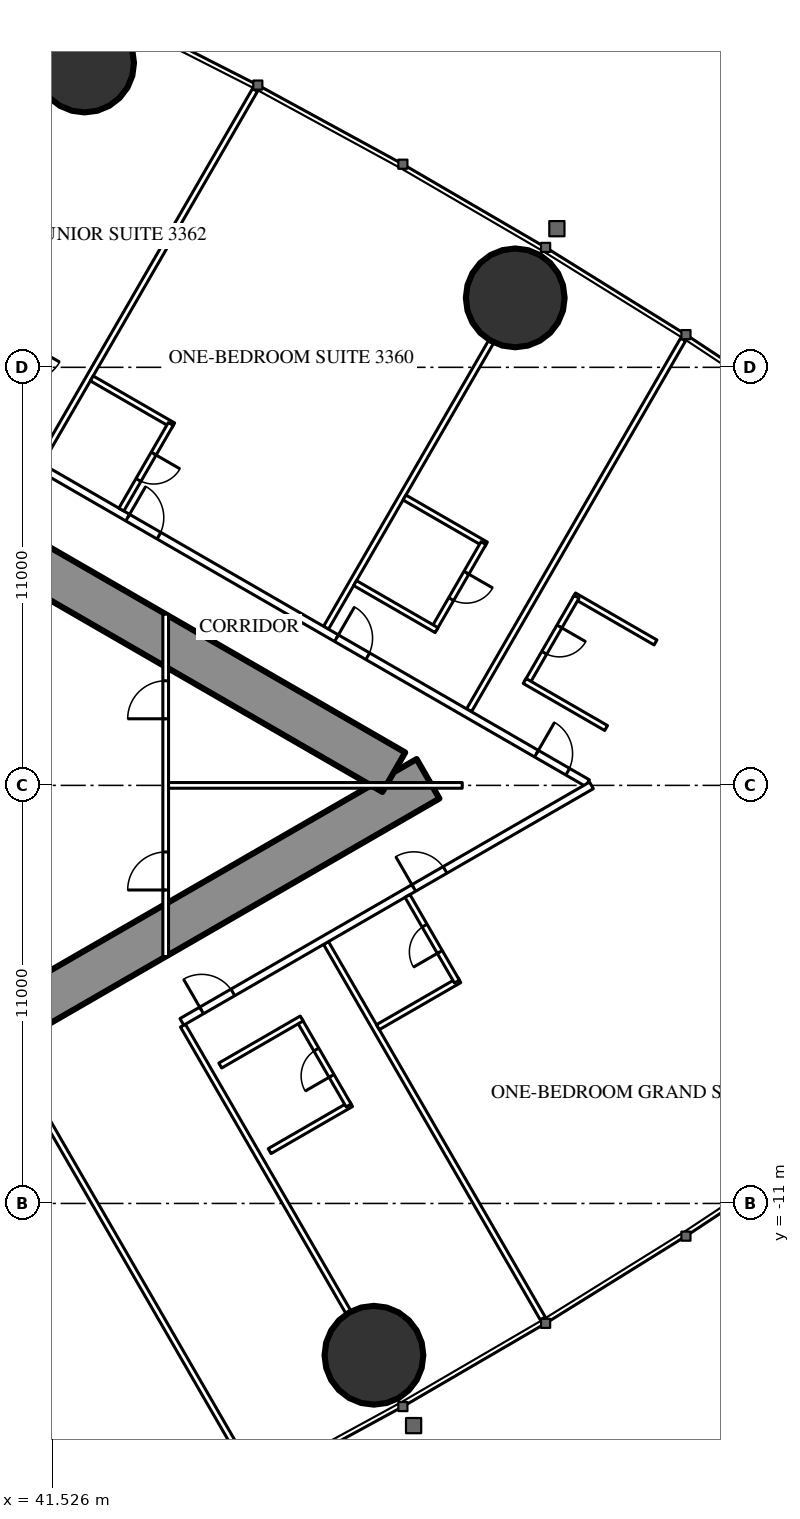
"""IFC4 building model, lengths in metres.
Left out: names, types, materials, properties, quantities, classifications, styles, units other than length and angle.
Written with IfcOpenShell. Run it as: python <this file> out.ifc"""

import sys

from ifc_helpers import new_model, si_unit, direction, frame, frame_2d, origin, origin_2d, place, context, subcontext, project, spatial, rectangle, hollow_circle, extrude, element, fill, save


model = new_model("IFC4")
c1 = context("Model", 3, precision=1e-05, world=origin(), true_north=direction((0.0, 1.0)))
c2 = subcontext(c1, "Body", "Model", "MODEL_VIEW")
j1 = project(units=[si_unit("LENGTHUNIT", "METRE"), si_unit("PLANEANGLEUNIT", "RADIAN")], contexts=[c1])
p1 = place(None, origin())
s1 = spatial("IfcSite", under=j1, at=p1, CompositionType="ELEMENT")
p2 = place(p1, origin())
s2 = spatial("IfcBuilding", under=s1, at=p2, CompositionType="ELEMENT")
p3 = place(p2, frame((0.0, 0.0, 125.6)))
s3 = spatial("IfcBuildingStorey", under=s2, at=p3, CompositionType="ELEMENT", Elevation=125.6)
for number, where, z_axis, x_axis in (
    (1, (53.697, 12.827, 0.0), (0.0, 0.0, 1.0), (1.0, 0.0, 0.0)),
    (2, (42.366, 19.007, 0.0), (0.0, 0.0, 1.0), (1.0, 0.0, 0.0)),
    (3, (49.979, -14.994, 0.0), (0.0, 0.0, 1.0), (1.0, 0.0, 0.0)),
):
    element("IfcColumn", number, at=place(p3, frame(where, z_axis=z_axis, x_axis=x_axis)), inside=s3, PredefinedType="COLUMN", context=c2, shape_type="SweptSolid", body=[
        extrude(hollow_circle(Radius=1.3, WallThickness=0.1, at=origin_2d()), origin(), (0.0, 0.0, 1.0), 3.5),
    ])
p4 = place(p3, frame((27.2, -13.8, 0.0), z_axis=(0.0, 0.0, 1.0), x_axis=(0.866027159892, 0.499996958321, 0.0)))
e4 = element("IfcWall", 4, at=p4, inside=s3, PredefinedType="SHEAR", context=c2, shape_type="SweptSolid", body=[
    extrude(rectangle(XDim=27.947, YDim=1.2, at=frame_2d((13.973, 0.0))), origin(), (0.0, 0.0, 1.0), 3.5),
])
p5 = place(p4, frame((4.6, 0.0, 0.0)))
e5 = element("IfcOpeningElement", 5, at=p5, cuts=e4, PredefinedType="OPENING", context=c2, shape_type="SweptSolid", body=[
    extrude(rectangle(XDim=1.0, YDim=2.2, at=frame_2d((0.5, 1.1))), frame((0.0, 0.61, 0.0), z_axis=(0.0, -1.0, 0.0), x_axis=(1.0, 0.0, 0.0)), (0.0, 0.0, 1.0), 1.22),
])
p6 = place(p4, frame((13.395, 0.0, 0.0)))
e6 = element("IfcOpeningElement", 6, at=p6, cuts=e4, PredefinedType="OPENING", context=c2, shape_type="SweptSolid", body=[
    extrude(rectangle(XDim=1.8, YDim=2.2, at=frame_2d((0.9, 1.1))), frame((0.0, 0.61, 0.0), z_axis=(0.0, -1.0, 0.0), x_axis=(1.0, 0.0, 0.0)), (0.0, 0.0, 1.0), 1.22),
])
p7 = place(p3, frame((27.2, 13.8, 0.0), z_axis=(0.0, 0.0, 1.0), x_axis=(0.866024515034, -0.500001539357, 0.0)))
e7 = element("IfcWall", 7, at=p7, inside=s3, PredefinedType="SHEAR", context=c2, shape_type="SweptSolid", body=[
    extrude(rectangle(XDim=26.907, YDim=1.2, at=frame_2d((13.454, 0.0))), origin(), (0.0, 0.0, 1.0), 3.5),
])
p8 = place(p7, frame((4.6, 0.0, 0.0)))
e8 = element("IfcOpeningElement", 8, at=p8, cuts=e7, PredefinedType="OPENING", context=c2, shape_type="SweptSolid", body=[
    extrude(rectangle(XDim=1.0, YDim=2.2, at=frame_2d((0.5, 1.1))), frame((0.0, 0.61, 0.0), z_axis=(0.0, -1.0, 0.0), x_axis=(1.0, 0.0, 0.0)), (0.0, 0.0, 1.0), 1.22),
])
p9 = place(p7, frame((13.395, 0.0, 0.0)))
e9 = element("IfcOpeningElement", 9, at=p9, cuts=e7, PredefinedType="OPENING", context=c2, shape_type="SweptSolid", body=[
    extrude(rectangle(XDim=1.8, YDim=2.2, at=frame_2d((0.9, 1.1))), frame((0.0, 0.61, 0.0), z_axis=(0.0, -1.0, 0.0), x_axis=(1.0, 0.0, 0.0)), (0.0, 0.0, 1.0), 1.22),
])
p10 = place(p3, frame((41.19, -8.494, 0.0), z_axis=(0.0, 0.0, 1.0), x_axis=(0.49999258054, -0.866029687369, 0.0)))
e10 = element("IfcWall", 10, at=p10, inside=s3, PredefinedType="PARTITIONING", context=c2, shape_type="SweptSolid", body=[
    extrude(rectangle(XDim=11.318, YDim=0.15, at=frame_2d((5.659, 0.0))), origin(), (0.0, 0.0, 1.0), 3.25),
])
p11 = place(p3, frame((44.954, -6.321, 0.0), z_axis=(0.0, 0.0, 1.0), x_axis=(0.500018676722, -0.866014620505, 0.0)))
e11 = element("IfcWall", 11, at=p11, inside=s3, PredefinedType="PARTITIONING", context=c2, shape_type="SweptSolid", body=[
    extrude(rectangle(XDim=8.704, YDim=0.15, at=frame_2d((4.352, 0.0))), origin(), (0.0, 0.0, 1.0), 2.2),
])
p12 = place(p3, frame((48.719, -4.147, 0.0), z_axis=(0.0, 0.0, 1.0), x_axis=(0.499990498062, -0.866030889661, 0.0)))
e12 = element("IfcWall", 12, at=p12, inside=s3, PredefinedType="PARTITIONING", context=c2, shape_type="SweptSolid", body=[
    extrude(rectangle(XDim=11.406, YDim=0.15, at=frame_2d((5.703, 0.0))), origin(), (0.0, 0.0, 1.0), 3.25),
])
p13 = place(p3, frame((41.19, 8.494, 0.0), z_axis=(0.0, 0.0, 1.0), x_axis=(0.49999258054, 0.866029687369, 0.0)))
e13 = element("IfcWall", 13, at=p13, inside=s3, PredefinedType="PARTITIONING", context=c2, shape_type="SweptSolid", body=[
    extrude(rectangle(XDim=11.318, YDim=0.15, at=frame_2d((5.659, 0.0))), origin(), (0.0, 0.0, 1.0), 3.25),
])
p14 = place(p3, frame((48.719, 4.147, 0.0), z_axis=(0.0, 0.0, 1.0), x_axis=(0.499993328235, 0.866029255696, 0.0)))
e14 = element("IfcWall", 14, at=p14, inside=s3, PredefinedType="PARTITIONING", context=c2, shape_type="SweptSolid", body=[
    extrude(rectangle(XDim=8.686, YDim=0.15, at=frame_2d((4.343, 0.0))), origin(), (0.0, 0.0, 1.0), 2.2),
])
p15 = place(p3, frame((52.481, 1.975, 0.0), z_axis=(0.0, 0.0, 1.0), x_axis=(0.500003867771, 0.866023170714, 0.0)))
e15 = element("IfcWall", 15, at=p15, inside=s3, PredefinedType="PARTITIONING", context=c2, shape_type="SweptSolid", body=[
    extrude(rectangle(XDim=11.265, YDim=0.15, at=frame_2d((5.632, 0.0))), origin(), (0.0, 0.0, 1.0), 3.25),
])
p16 = place(p3, frame((40.105, -15.299, 0.0), z_axis=(0.0, 0.0, 1.0), x_axis=(0.499978822259, -0.866037630414, 0.0)))
e16 = element("IfcWall", 16, at=p16, inside=s3, PredefinedType="PARTITIONING", context=c2, shape_type="SweptSolid", body=[
    extrude(rectangle(XDim=3.023, YDim=0.15, at=frame_2d((1.511, 0.0))), origin(), (0.0, 0.0, 1.0), 3.25),
])
p17 = place(p3, frame((36.834, 10.894, 0.0), z_axis=(0.0, 0.0, 1.0), x_axis=(0.866028157229, -0.499995230863, 0.0)))
e17 = element("IfcWall", 17, at=p17, inside=s3, PredefinedType="PARTITIONING", context=c2, shape_type="SweptSolid", body=[
    extrude(rectangle(XDim=21.667, YDim=0.2, at=frame_2d((10.833, 0.0))), origin(), (0.0, 0.0, 1.0), 3.25),
])
p18 = place(p17, frame((20.117, 0.0, 0.0)))
e18 = element("IfcOpeningElement", 18, at=p18, cuts=e17, PredefinedType="OPENING", context=c2, shape_type="SweptSolid", body=[
    extrude(rectangle(XDim=0.95, YDim=2.2, at=frame_2d((0.475, 1.1))), frame((0.0, 0.11, 0.0), z_axis=(0.0, -1.0, 0.0), x_axis=(1.0, 0.0, 0.0)), (0.0, 0.0, 1.0), 0.22),
])
p19 = place(p17, frame((14.04, 0.0, 0.0)))
e19 = element("IfcOpeningElement", 19, at=p19, cuts=e17, PredefinedType="OPENING", context=c2, shape_type="SweptSolid", body=[
    extrude(rectangle(XDim=0.95, YDim=2.2, at=frame_2d((0.475, 1.1))), frame((0.0, 0.11, 0.0), z_axis=(0.0, -1.0, 0.0), x_axis=(1.0, 0.0, 0.0)), (0.0, 0.0, 1.0), 0.22),
])
p20 = place(p17, frame((7.697, 0.0, 0.0)))
e20 = element("IfcOpeningElement", 20, at=p20, cuts=e17, PredefinedType="OPENING", context=c2, shape_type="SweptSolid", body=[
    extrude(rectangle(XDim=0.95, YDim=2.2, at=frame_2d((0.475, 1.1))), frame((0.0, 0.11, 0.0), z_axis=(0.0, -1.0, 0.0), x_axis=(1.0, 0.0, 0.0)), (0.0, 0.0, 1.0), 0.22),
])
p21 = place(p17, frame((3.35, 0.0, 0.0)))
e21 = element("IfcOpeningElement", 21, at=p21, cuts=e17, PredefinedType="OPENING", context=c2, shape_type="SweptSolid", body=[
    extrude(rectangle(XDim=1.0, YDim=2.2, at=frame_2d((0.5, 1.1))), frame((0.0, 0.11, 0.0), z_axis=(0.0, -1.0, 0.0), x_axis=(1.0, 0.0, 0.0)), (0.0, 0.0, 1.0), 0.22),
])
p22 = place(p3, frame((44.925, -6.222, 0.0), z_axis=(0.0, 0.0, 1.0), x_axis=(0.866020269055, 0.500008893506, 0.0)))
e22 = element("IfcWall", 22, at=p22, inside=s3, PredefinedType="PARTITIONING", context=c2, shape_type="SweptSolid", body=[
    extrude(rectangle(XDim=12.444, YDim=0.2, at=frame_2d((6.222, 0.0))), origin(), (0.0, 0.0, 1.0), 3.25),
])
p23 = place(p22, frame((0.6, 0.0, 0.0)))
e23 = element("IfcOpeningElement", 23, at=p23, cuts=e22, PredefinedType="OPENING", context=c2, shape_type="SweptSolid", body=[
    extrude(rectangle(XDim=0.95, YDim=2.2, at=frame_2d((0.475, 1.1))), frame((0.0, 0.11, 0.0), z_axis=(0.0, -1.0, 0.0), x_axis=(1.0, 0.0, 0.0)), (0.0, 0.0, 1.0), 0.22),
])
p24 = place(p22, frame((7.047, 0.0, 0.0)))
e24 = element("IfcOpeningElement", 24, at=p24, cuts=e22, PredefinedType="OPENING", context=c2, shape_type="SweptSolid", body=[
    extrude(rectangle(XDim=0.95, YDim=2.2, at=frame_2d((0.475, 1.1))), frame((0.0, 0.11, 0.0), z_axis=(0.0, -1.0, 0.0), x_axis=(1.0, 0.0, 0.0)), (0.0, 0.0, 1.0), 0.22),
])
p25 = place(p3, frame((47.235, -9.623, 0.0), z_axis=(0.0, 0.0, 1.0), x_axis=(0.866006523861, 0.500032699561, 0.0)))
e25 = element("IfcWall", 25, at=p25, inside=s3, PredefinedType="PARTITIONING", context=c2, shape_type="SweptSolid", body=[
    extrude(rectangle(XDim=2.475, YDim=0.15, at=frame_2d((1.237, 0.0))), origin(), (0.0, 0.0, 1.0), 3.25),
])
p26 = place(p3, frame((48.013, -6.171, 0.0), z_axis=(0.0, 0.0, 1.0), x_axis=(0.500006934395, -0.866021400173, 0.0)))
e26 = element("IfcWall", 26, at=p26, inside=s3, PredefinedType="PARTITIONING", context=c2, shape_type="SweptSolid", body=[
    extrude(rectangle(XDim=2.6, YDim=0.15, at=frame_2d((1.3, 0.0))), origin(), (0.0, 0.0, 1.0), 3.25),
])
p27 = place(p26, frame((0.9, 0.0, 0.0)))
e27 = element("IfcOpeningElement", 27, at=p27, cuts=e26, PredefinedType="OPENING", context=c2, shape_type="SweptSolid", body=[
    extrude(rectangle(XDim=0.8, YDim=2.2, at=frame_2d((0.4, 1.1))), frame((0.0, 0.085, 0.0), z_axis=(0.0, -1.0, 0.0), x_axis=(1.0, 0.0, 0.0)), (0.0, 0.0, 1.0), 0.17),
])
p28 = place(p3, frame((45.935, -7.371, 0.0), z_axis=(0.0, 0.0, 1.0), x_axis=(0.866031185235, 0.4999899861, 0.0)))
e28 = element("IfcWall", 28, at=p28, inside=s3, PredefinedType="PARTITIONING", context=c2, shape_type="SweptSolid", body=[
    extrude(rectangle(XDim=2.475, YDim=0.15, at=frame_2d((1.238, 0.0))), origin(), (0.0, 0.0, 1.0), 3.25),
])
p29 = place(p3, frame((50.083, -6.362, 0.0), z_axis=(0.0, 0.0, 1.0), x_axis=(0.866006523861, 0.500032699561, 0.0)))
e29 = element("IfcWall", 29, at=p29, inside=s3, PredefinedType="PARTITIONING", context=c2, shape_type="SweptSolid", body=[
    extrude(rectangle(XDim=2.475, YDim=0.15, at=frame_2d((1.237, 0.0))), origin(), (0.0, 0.0, 1.0), 3.25),
])
p30 = place(p3, frame((50.862, -2.91, 0.0), z_axis=(0.0, 0.0, 1.0), x_axis=(0.500047596559, -0.865997922154, 0.0)))
e30 = element("IfcWall", 30, at=p30, inside=s3, PredefinedType="PARTITIONING", context=c2, shape_type="SweptSolid", body=[
    extrude(rectangle(XDim=2.6, YDim=0.15, at=frame_2d((1.3, 0.0))), origin(), (0.0, 0.0, 1.0), 3.25),
])
p31 = place(p30, frame((0.9, 0.0, 0.0)))
e31 = element("IfcOpeningElement", 31, at=p31, cuts=e30, PredefinedType="OPENING", context=c2, shape_type="SweptSolid", body=[
    extrude(rectangle(XDim=0.8, YDim=2.2, at=frame_2d((0.4, 1.1))), frame((0.0, 0.085, 0.0), z_axis=(0.0, -1.0, 0.0), x_axis=(1.0, 0.0, 0.0)), (0.0, 0.0, 1.0), 0.17),
])
p32 = place(p3, frame((55.245, 4.998, 0.0), z_axis=(0.0, 0.0, 1.0), x_axis=(0.866006523861, -0.500032699561, 0.0)))
e32 = element("IfcWall", 32, at=p32, inside=s3, PredefinedType="PARTITIONING", context=c2, shape_type="SweptSolid", body=[
    extrude(rectangle(XDim=2.475, YDim=0.15, at=frame_2d((1.237, 0.0))), origin(), (0.0, 0.0, 1.0), 3.25),
])
p33 = place(p3, frame((54.01, 2.709, 0.0), z_axis=(0.0, 0.0, 1.0), x_axis=(0.500006934395, 0.866021400173, 0.0)))
e33 = element("IfcWall", 33, at=p33, inside=s3, PredefinedType="PARTITIONING", context=c2, shape_type="SweptSolid", body=[
    extrude(rectangle(XDim=2.6, YDim=0.15, at=frame_2d((1.3, 0.0))), origin(), (0.0, 0.0, 1.0), 3.25),
])
p34 = place(p33, frame((0.9, 0.0, 0.0)))
e34 = element("IfcOpeningElement", 34, at=p34, cuts=e33, PredefinedType="OPENING", context=c2, shape_type="SweptSolid", body=[
    extrude(rectangle(XDim=0.8, YDim=2.2, at=frame_2d((0.4, 1.1))), frame((0.0, 0.085, 0.0), z_axis=(0.0, -1.0, 0.0), x_axis=(1.0, 0.0, 0.0)), (0.0, 0.0, 1.0), 0.17),
])
p35 = place(p3, frame((53.945, 2.747, 0.0), z_axis=(0.0, 0.0, 1.0), x_axis=(0.866031185235, -0.4999899861, 0.0)))
e35 = element("IfcWall", 35, at=p35, inside=s3, PredefinedType="PARTITIONING", context=c2, shape_type="SweptSolid", body=[
    extrude(rectangle(XDim=2.475, YDim=0.15, at=frame_2d((1.238, 0.0))), origin(), (0.0, 0.0, 1.0), 3.25),
])
p36 = place(p3, frame((50.783, 7.574, 0.0), z_axis=(0.0, 0.0, 1.0), x_axis=(0.866006523861, -0.500032699561, 0.0)))
e36 = element("IfcWall", 36, at=p36, inside=s3, PredefinedType="PARTITIONING", context=c2, shape_type="SweptSolid", body=[
    extrude(rectangle(XDim=2.475, YDim=0.15, at=frame_2d((1.237, 0.0))), origin(), (0.0, 0.0, 1.0), 3.25),
])
p37 = place(p3, frame((51.562, 4.123, 0.0), z_axis=(0.0, 0.0, 1.0), x_axis=(0.49997716683, 0.86603858612, 0.0)))
e37 = element("IfcWall", 37, at=p37, inside=s3, PredefinedType="PARTITIONING", context=c2, shape_type="SweptSolid", body=[
    extrude(rectangle(XDim=2.6, YDim=0.15, at=frame_2d((1.3, 0.0))), origin(), (0.0, 0.0, 1.0), 3.25),
])
p38 = place(p37, frame((0.9, 0.0, 0.0)))
e38 = element("IfcOpeningElement", 38, at=p38, cuts=e37, PredefinedType="OPENING", context=c2, shape_type="SweptSolid", body=[
    extrude(rectangle(XDim=0.8, YDim=2.2, at=frame_2d((0.4, 1.1))), frame((0.0, 0.085, 0.0), z_axis=(0.0, -1.0, 0.0), x_axis=(1.0, 0.0, 0.0)), (0.0, 0.0, 1.0), 0.17),
])
for number, where, z_axis, x_axis in (
    (39, (49.483, 5.323, 0.0), (0.0, 0.0, 1.0), (0.866, -0.5, 0.0)),
    (40, (42.555, 10.708, 0.0), (0.0, 0.0, 1.0), (0.866, -0.5, 0.0)),
):
    element("IfcWall", number, at=place(p3, frame(where, z_axis=z_axis, x_axis=x_axis)), inside=s3, PredefinedType="PARTITIONING", context=c2, shape_type="SweptSolid", body=[
        extrude(rectangle(XDim=2.475, YDim=0.15, at=frame_2d((1.238, 0.0))), origin(), (0.0, 0.0, 1.0), 3.25),
    ])
p39 = place(p3, frame((43.333, 7.257, 0.0), z_axis=(0.0, 0.0, 1.0), x_axis=(0.500006934395, 0.866021400173, 0.0)))
e41 = element("IfcWall", 41, at=p39, inside=s3, PredefinedType="PARTITIONING", context=c2, shape_type="SweptSolid", body=[
    extrude(rectangle(XDim=2.6, YDim=0.15, at=frame_2d((1.3, 0.0))), origin(), (0.0, 0.0, 1.0), 3.25),
])
p40 = place(p39, frame((0.9, 0.0, 0.0)))
e42 = element("IfcOpeningElement", 42, at=p40, cuts=e41, PredefinedType="OPENING", context=c2, shape_type="SweptSolid", body=[
    extrude(rectangle(XDim=0.8, YDim=2.2, at=frame_2d((0.4, 1.1))), frame((0.0, 0.085, 0.0), z_axis=(0.0, -1.0, 0.0), x_axis=(1.0, 0.0, 0.0)), (0.0, 0.0, 1.0), 0.17),
])
p41 = place(p3, frame((44.5, -4.505, 0.0), z_axis=(0.0, 0.0, 1.0), x_axis=(0.0, 1.0, 0.0)))
e43 = element("IfcWall", 43, at=p41, inside=s3, PredefinedType="PARTITIONING", context=c2, shape_type="SweptSolid", body=[
    extrude(rectangle(XDim=9.009, YDim=0.15, at=frame_2d((4.505, 0.0))), origin(), (0.0, 0.0, 1.0), 2.45),
])
p42 = place(p41, frame((1.752, 0.0, 0.0)))
e44 = element("IfcOpeningElement", 44, at=p42, cuts=e43, PredefinedType="OPENING", context=c2, shape_type="SweptSolid", body=[
    extrude(rectangle(XDim=1.0, YDim=2.2, at=frame_2d((0.5, 1.1))), frame((0.0, 0.085, 0.0), z_axis=(0.0, -1.0, 0.0), x_axis=(1.0, 0.0, 0.0)), (0.0, 0.0, 1.0), 0.17),
])
p43 = place(p41, frame((6.257, 0.0, 0.0)))
e45 = element("IfcOpeningElement", 45, at=p43, cuts=e43, PredefinedType="OPENING", context=c2, shape_type="SweptSolid", body=[
    extrude(rectangle(XDim=1.0, YDim=2.2, at=frame_2d((0.5, 1.1))), frame((0.0, 0.085, 0.0), z_axis=(0.0, -1.0, 0.0), x_axis=(1.0, 0.0, 0.0)), (0.0, 0.0, 1.0), 0.17),
])
p44 = place(p3, frame((44.575, 0.0, 0.0), z_axis=(0.0, 0.0, 1.0), x_axis=(1.0, 0.0, 0.0)))
e46 = element("IfcWall", 46, at=p44, inside=s3, PredefinedType="PARTITIONING", context=c2, shape_type="SweptSolid", body=[
    extrude(rectangle(XDim=7.727, YDim=0.15, at=frame_2d((3.864, 0.0))), origin(), (0.0, 0.0, 1.0), 2.2),
])
p45 = place(p27, origin())
e47 = element("IfcDoor", 47, at=p45, inside=s3, OperationType="SINGLE_SWING_RIGHT", PredefinedType="DOOR", context=c2, shape_type="SweptSolid", body=[
    extrude(rectangle(XDim=0.8, YDim=2.2, at=frame_2d((0.4, 1.1))), frame((0.0, 0.025, 0.0), z_axis=(0.0, -1.0, 0.0), x_axis=(1.0, 0.0, 0.0)), (0.0, 0.0, 1.0), 0.05),
])
fill(e27, e47)
p46 = place(p23, origin())
e48 = element("IfcDoor", 48, at=p46, inside=s3, OperationType="SINGLE_SWING_LEFT", PredefinedType="DOOR", context=c2, shape_type="SweptSolid", body=[
    extrude(rectangle(XDim=0.95, YDim=2.2, at=frame_2d((0.475, 1.1))), frame((0.0, 0.025, 0.0), z_axis=(0.0, -1.0, 0.0), x_axis=(1.0, 0.0, 0.0)), (0.0, 0.0, 1.0), 0.05),
])
fill(e23, e48)
p47 = place(p31, origin())
e49 = element("IfcDoor", 49, at=p47, inside=s3, OperationType="SINGLE_SWING_RIGHT", PredefinedType="DOOR", context=c2, shape_type="SweptSolid", body=[
    extrude(rectangle(XDim=0.8, YDim=2.2, at=frame_2d((0.4, 1.1))), frame((0.0, 0.025, 0.0), z_axis=(0.0, -1.0, 0.0), x_axis=(1.0, 0.0, 0.0)), (0.0, 0.0, 1.0), 0.05),
])
fill(e31, e49)
p48 = place(p24, origin())
e50 = element("IfcDoor", 50, at=p48, inside=s3, OperationType="SINGLE_SWING_LEFT", PredefinedType="DOOR", context=c2, shape_type="SweptSolid", body=[
    extrude(rectangle(XDim=0.95, YDim=2.2, at=frame_2d((0.475, 1.1))), frame((0.0, 0.025, 0.0), z_axis=(0.0, -1.0, 0.0), x_axis=(1.0, 0.0, 0.0)), (0.0, 0.0, 1.0), 0.05),
])
fill(e24, e50)
p49 = place(p34, origin())
e51 = element("IfcDoor", 51, at=p49, inside=s3, OperationType="SINGLE_SWING_RIGHT", PredefinedType="DOOR", context=c2, shape_type="SweptSolid", body=[
    extrude(rectangle(XDim=0.8, YDim=2.2, at=frame_2d((0.4, 1.1))), frame((0.0, 0.025, 0.0), z_axis=(0.0, -1.0, 0.0), x_axis=(1.0, 0.0, 0.0)), (0.0, 0.0, 1.0), 0.05),
])
fill(e34, e51)
p50 = place(p18, origin())
e52 = element("IfcDoor", 52, at=p50, inside=s3, OperationType="SINGLE_SWING_LEFT", PredefinedType="DOOR", context=c2, shape_type="SweptSolid", body=[
    extrude(rectangle(XDim=0.95, YDim=2.2, at=frame_2d((0.475, 1.1))), frame((0.0, 0.025, 0.0), z_axis=(0.0, -1.0, 0.0), x_axis=(1.0, 0.0, 0.0)), (0.0, 0.0, 1.0), 0.05),
])
fill(e18, e52)
p51 = place(p38, origin())
e53 = element("IfcDoor", 53, at=p51, inside=s3, OperationType="SINGLE_SWING_RIGHT", PredefinedType="DOOR", context=c2, shape_type="SweptSolid", body=[
    extrude(rectangle(XDim=0.8, YDim=2.2, at=frame_2d((0.4, 1.1))), frame((0.0, 0.025, 0.0), z_axis=(0.0, -1.0, 0.0), x_axis=(1.0, 0.0, 0.0)), (0.0, 0.0, 1.0), 0.05),
])
fill(e38, e53)
p52 = place(p19, origin())
e54 = element("IfcDoor", 54, at=p52, inside=s3, OperationType="SINGLE_SWING_LEFT", PredefinedType="DOOR", context=c2, shape_type="SweptSolid", body=[
    extrude(rectangle(XDim=0.95, YDim=2.2, at=frame_2d((0.475, 1.1))), frame((0.0, 0.025, 0.0), z_axis=(0.0, -1.0, 0.0), x_axis=(1.0, 0.0, 0.0)), (0.0, 0.0, 1.0), 0.05),
])
fill(e19, e54)
p53 = place(p40, origin())
e55 = element("IfcDoor", 55, at=p53, inside=s3, OperationType="SINGLE_SWING_RIGHT", PredefinedType="DOOR", context=c2, shape_type="SweptSolid", body=[
    extrude(rectangle(XDim=0.8, YDim=2.2, at=frame_2d((0.4, 1.1))), frame((0.0, 0.025, 0.0), z_axis=(0.0, -1.0, 0.0), x_axis=(1.0, 0.0, 0.0)), (0.0, 0.0, 1.0), 0.05),
])
fill(e42, e55)
p54 = place(p20, origin())
e56 = element("IfcDoor", 56, at=p54, inside=s3, OperationType="SINGLE_SWING_LEFT", PredefinedType="DOOR", context=c2, shape_type="SweptSolid", body=[
    extrude(rectangle(XDim=0.95, YDim=2.2, at=frame_2d((0.475, 1.1))), frame((0.0, 0.025, 0.0), z_axis=(0.0, -1.0, 0.0), x_axis=(1.0, 0.0, 0.0)), (0.0, 0.0, 1.0), 0.05),
])
fill(e20, e56)
p55 = place(p42, origin())
e57 = element("IfcDoor", 57, at=p55, inside=s3, OperationType="SINGLE_SWING_LEFT", PredefinedType="DOOR", context=c2, shape_type="SweptSolid", body=[
    extrude(rectangle(XDim=1.0, YDim=2.2, at=frame_2d((0.5, 1.1))), frame((0.0, 0.025, 0.0), z_axis=(0.0, -1.0, 0.0), x_axis=(1.0, 0.0, 0.0)), (0.0, 0.0, 1.0), 0.05),
])
fill(e44, e57)
p56 = place(p43, origin())
e58 = element("IfcDoor", 58, at=p56, inside=s3, OperationType="SINGLE_SWING_LEFT", PredefinedType="DOOR", context=c2, shape_type="SweptSolid", body=[
    extrude(rectangle(XDim=1.0, YDim=2.2, at=frame_2d((0.5, 1.1))), frame((0.0, 0.025, 0.0), z_axis=(0.0, -1.0, 0.0), x_axis=(1.0, 0.0, 0.0)), (0.0, 0.0, 1.0), 0.05),
])
fill(e45, e58)
save(model, sys.argv[1])
